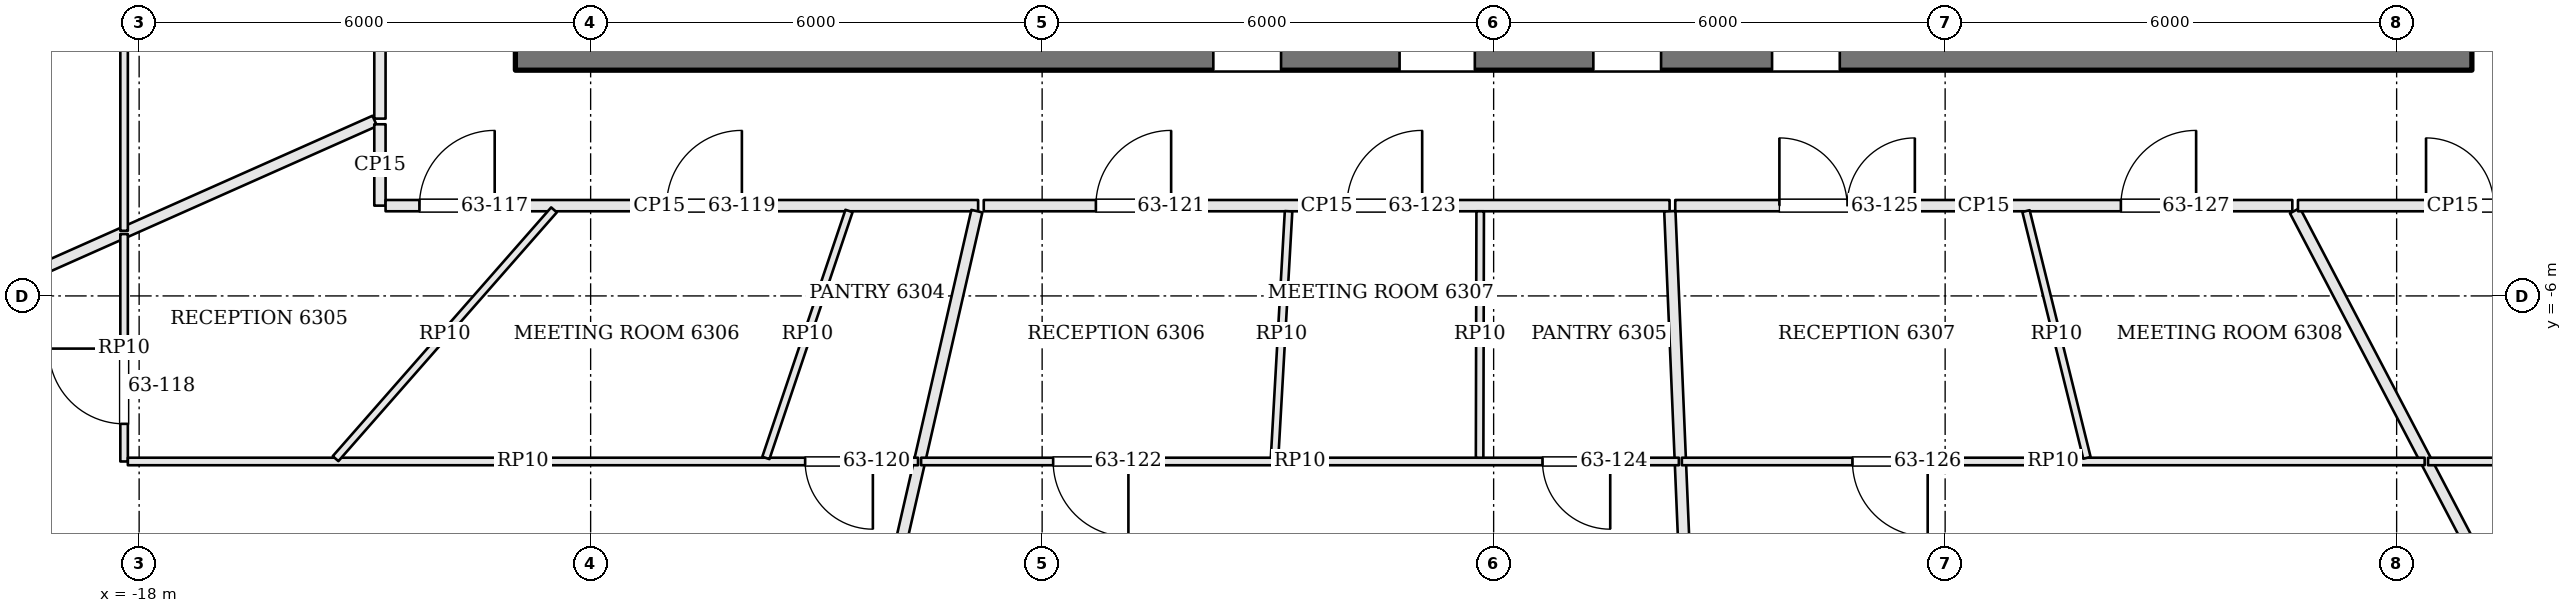
"""IFC4 building model, lengths in metres.
Left out: names, types, materials, properties, quantities, classifications, styles, units other than length and angle.
Written with IfcOpenShell. Run it as: python <this file> out.ifc"""

import sys

from ifc_helpers import new_model, si_unit, direction, frame, frame_2d, origin, place, context, subcontext, project, spatial, rectangle, extrude, element, fill, save


model = new_model("IFC4")
c1 = context("Model", 3, precision=1e-05, world=origin(), true_north=direction((0.0, 1.0)))
c2 = subcontext(c1, "Body", "Model", "MODEL_VIEW")
j1 = project(units=[si_unit("LENGTHUNIT", "METRE"), si_unit("PLANEANGLEUNIT", "RADIAN")], contexts=[c1])
p1 = place(None, origin())
s1 = spatial("IfcSite", under=j1, at=p1, CompositionType="ELEMENT")
p2 = place(p1, origin())
s2 = spatial("IfcBuilding", under=s1, at=p2, CompositionType="ELEMENT")
p3 = place(p2, frame((0.0, 0.0, 256.5)))
s3 = spatial("IfcBuildingStorey", under=s2, at=p3, CompositionType="ELEMENT", Elevation=256.5)
p4 = place(p3, frame((-13.0, -2.6, 0.0), z_axis=(0.0, 0.0, 1.0), x_axis=(1.0, 0.0, 0.0)))
e1 = element("IfcWall", 1, at=p4, inside=s3, PredefinedType="SHEAR", context=c2, shape_type="SweptSolid", body=[
    extrude(rectangle(XDim=26.0, YDim=0.8, at=frame_2d((13.0, 0.0))), origin(), (0.0, 0.0, 1.0), 3.9),
])
p5 = place(p4, frame((9.275, 0.0, 0.0)))
e2 = element("IfcOpeningElement", 2, at=p5, cuts=e1, PredefinedType="OPENING", context=c2, shape_type="SweptSolid", body=[
    extrude(rectangle(XDim=0.9, YDim=2.1, at=frame_2d((0.45, 1.05))), frame((0.0, 0.41, 0.0), z_axis=(0.0, -1.0, 0.0), x_axis=(1.0, 0.0, 0.0)), (0.0, 0.0, 1.0), 0.82),
])
p6 = place(p4, frame((11.75, 0.0, 0.0)))
e3 = element("IfcOpeningElement", 3, at=p6, cuts=e1, PredefinedType="OPENING", context=c2, shape_type="SweptSolid", body=[
    extrude(rectangle(XDim=1.0, YDim=2.1, at=frame_2d((0.5, 1.05))), frame((0.0, 0.41, 0.0), z_axis=(0.0, -1.0, 0.0), x_axis=(1.0, 0.0, 0.0)), (0.0, 0.0, 1.0), 0.82),
])
p7 = place(p4, frame((14.325, 0.0, 0.0)))
e4 = element("IfcOpeningElement", 4, at=p7, cuts=e1, PredefinedType="OPENING", context=c2, shape_type="SweptSolid", body=[
    extrude(rectangle(XDim=0.9, YDim=2.1, at=frame_2d((0.45, 1.05))), frame((0.0, 0.41, 0.0), z_axis=(0.0, -1.0, 0.0), x_axis=(1.0, 0.0, 0.0)), (0.0, 0.0, 1.0), 0.82),
])
p8 = place(p4, frame((16.7, 0.0, 0.0)))
e5 = element("IfcOpeningElement", 5, at=p8, cuts=e1, PredefinedType="OPENING", context=c2, shape_type="SweptSolid", body=[
    extrude(rectangle(XDim=0.9, YDim=2.1, at=frame_2d((0.45, 1.05))), frame((0.0, 0.41, 0.0), z_axis=(0.0, -1.0, 0.0), x_axis=(1.0, 0.0, 0.0)), (0.0, 0.0, 1.0), 0.82),
])
p9 = place(p3, frame((-14.8, 3.557, 0.0), z_axis=(0.0, 0.0, 1.0), x_axis=(0.0, -1.0, 0.0)))
e6 = element("IfcWall", 6, at=p9, inside=s3, PredefinedType="PARTITIONING", context=c2, shape_type="SweptSolid", body=[
    extrude(rectangle(XDim=7.2, YDim=0.15, at=frame_2d((3.6, 0.0))), origin(), (0.0, 0.0, 1.0), 3.084),
])
p10 = place(p9, frame((1.167, 0.0, 0.0)))
e7 = element("IfcOpeningElement", 7, at=p10, cuts=e6, PredefinedType="OPENING", context=c2, shape_type="SweptSolid", body=[
    extrude(rectangle(XDim=1.0, YDim=2.1, at=frame_2d((0.5, 1.05))), frame((0.0, 0.085, 0.0), z_axis=(0.0, -1.0, 0.0), x_axis=(1.0, 0.0, 0.0)), (0.0, 0.0, 1.0), 0.17),
])
p11 = place(p9, frame((4.805, 0.0, 0.0)))
e8 = element("IfcOpeningElement", 8, at=p11, cuts=e6, PredefinedType="OPENING", context=c2, shape_type="SweptSolid", body=[
    extrude(rectangle(XDim=1.0, YDim=2.4, at=frame_2d((0.5, 1.2))), frame((0.0, 0.085, 0.0), z_axis=(0.0, -1.0, 0.0), x_axis=(1.0, 0.0, 0.0)), (0.0, 0.0, 1.0), 0.17),
])
p12 = place(p3, frame((-26.367, -8.789, 0.0), z_axis=(0.0, 0.0, 1.0), x_axis=(0.913681107159, 0.40643183244, 0.0)))
e9 = element("IfcWall", 9, at=p12, inside=s3, PredefinedType="PARTITIONING", context=c2, shape_type="SweptSolid", body=[
    extrude(rectangle(XDim=12.585, YDim=0.15, at=frame_2d((6.292, 0.0))), origin(), (0.0, 0.0, 1.0), 3.084),
])
p13 = place(p3, frame((-14.8, -3.719, 0.0), z_axis=(0.0, 0.0, 1.0), x_axis=(0.0, -1.0, 0.0)))
e10 = element("IfcWall", 10, at=p13, inside=s3, PredefinedType="PARTITIONING", context=c2, shape_type="SweptSolid", body=[
    extrude(rectangle(XDim=1.081, YDim=0.15, at=frame_2d((0.541, 0.0))), origin(), (0.0, 0.0, 1.0), 3.084),
])
p14 = place(p3, frame((-14.725, -4.8, 0.0), z_axis=(0.0, 0.0, 1.0), x_axis=(1.0, 0.0, 0.0)))
e11 = element("IfcWall", 11, at=p14, inside=s3, PredefinedType="PARTITIONING", context=c2, shape_type="SweptSolid", body=[
    extrude(rectangle(XDim=7.875, YDim=0.15, at=frame_2d((3.937, 0.0))), origin(), (0.0, 0.0, 1.0), 3.084),
])
p15 = place(p14, frame((0.45, 0.0, 0.0)))
e12 = element("IfcOpeningElement", 12, at=p15, cuts=e11, PredefinedType="OPENING", context=c2, shape_type="SweptSolid", body=[
    extrude(rectangle(XDim=1.0, YDim=2.1, at=frame_2d((0.5, 1.05))), frame((0.0, 0.085, 0.0), z_axis=(0.0, -1.0, 0.0), x_axis=(1.0, 0.0, 0.0)), (0.0, 0.0, 1.0), 0.17),
])
p16 = place(p14, frame((3.735, 0.0, 0.0)))
e13 = element("IfcOpeningElement", 13, at=p16, cuts=e11, PredefinedType="OPENING", context=c2, shape_type="SweptSolid", body=[
    extrude(rectangle(XDim=1.0, YDim=2.4, at=frame_2d((0.5, 1.2))), frame((0.0, 0.085, 0.0), z_axis=(0.0, -1.0, 0.0), x_axis=(1.0, 0.0, 0.0)), (0.0, 0.0, 1.0), 0.17),
])
p17 = place(p3, frame((-10.519, -20.825, 0.0), z_axis=(0.0, 0.0, 1.0), x_axis=(0.223124554472, 0.974789943112, 0.0)))
e14 = element("IfcWall", 14, at=p17, inside=s3, PredefinedType="PARTITIONING", context=c2, shape_type="SweptSolid", body=[
    extrude(rectangle(XDim=16.365, YDim=0.15, at=frame_2d((8.182, 0.0))), origin(), (0.0, 0.0, 1.0), 3.084),
])
p18 = place(p3, frame((-6.776, -4.8, 0.0), z_axis=(0.0, 0.0, 1.0), x_axis=(1.0, 0.0, 0.0)))
e15 = element("IfcWall", 15, at=p18, inside=s3, PredefinedType="PARTITIONING", context=c2, shape_type="SweptSolid", body=[
    extrude(rectangle(XDim=9.114, YDim=0.15, at=frame_2d((4.557, 0.0))), origin(), (0.0, 0.0, 1.0), 3.084),
])
p19 = place(p18, frame((1.49, 0.0, 0.0)))
e16 = element("IfcOpeningElement", 16, at=p19, cuts=e15, PredefinedType="OPENING", context=c2, shape_type="SweptSolid", body=[
    extrude(rectangle(XDim=1.0, YDim=2.1, at=frame_2d((0.5, 1.05))), frame((0.0, 0.085, 0.0), z_axis=(0.0, -1.0, 0.0), x_axis=(1.0, 0.0, 0.0)), (0.0, 0.0, 1.0), 0.17),
])
p20 = place(p18, frame((4.826, 0.0, 0.0)))
e17 = element("IfcOpeningElement", 17, at=p20, cuts=e15, PredefinedType="OPENING", context=c2, shape_type="SweptSolid", body=[
    extrude(rectangle(XDim=1.0, YDim=2.4, at=frame_2d((0.5, 1.2))), frame((0.0, 0.085, 0.0), z_axis=(0.0, -1.0, 0.0), x_axis=(1.0, 0.0, 0.0)), (0.0, 0.0, 1.0), 0.17),
])
p21 = place(p3, frame((2.887, -17.832, 0.0), z_axis=(0.0, 0.0, 1.0), x_axis=(-0.042037723884, 0.999116024179, 0.0)))
e18 = element("IfcWall", 18, at=p21, inside=s3, PredefinedType="PARTITIONING", context=c2, shape_type="SweptSolid", body=[
    extrude(rectangle(XDim=12.969, YDim=0.15, at=frame_2d((6.484, 0.0))), origin(), (0.0, 0.0, 1.0), 3.084),
])
p22 = place(p3, frame((2.413, -4.8, 0.0), z_axis=(0.0, 0.0, 1.0), x_axis=(1.0, 0.0, 0.0)))
e19 = element("IfcWall", 19, at=p22, inside=s3, PredefinedType="PARTITIONING", context=c2, shape_type="SweptSolid", body=[
    extrude(rectangle(XDim=8.2, YDim=0.15, at=frame_2d((4.1, 0.0))), origin(), (0.0, 0.0, 1.0), 3.084),
])
p23 = place(p22, frame((1.384, 0.0, 0.0)))
e20 = element("IfcOpeningElement", 20, at=p23, cuts=e19, PredefinedType="OPENING", context=c2, shape_type="SweptSolid", body=[
    extrude(rectangle(XDim=1.8, YDim=2.1, at=frame_2d((0.9, 1.05))), frame((0.0, 0.085, 0.0), z_axis=(0.0, -1.0, 0.0), x_axis=(1.0, 0.0, 0.0)), (0.0, 0.0, 1.0), 0.17),
])
p24 = place(p22, frame((5.922, 0.0, 0.0)))
e21 = element("IfcOpeningElement", 21, at=p24, cuts=e19, PredefinedType="OPENING", context=c2, shape_type="SweptSolid", body=[
    extrude(rectangle(XDim=1.0, YDim=2.4, at=frame_2d((0.5, 1.2))), frame((0.0, 0.085, 0.0), z_axis=(0.0, -1.0, 0.0), x_axis=(1.0, 0.0, 0.0)), (0.0, 0.0, 1.0), 0.17),
])
p25 = place(p3, frame((17.193, -17.36, 0.0), z_axis=(0.0, 0.0, 1.0), x_axis=(-0.464008288338, 0.885830857643, 0.0)))
e22 = element("IfcWall", 22, at=p25, inside=s3, PredefinedType="PARTITIONING", context=c2, shape_type="SweptSolid", body=[
    extrude(rectangle(XDim=14.104, YDim=0.15, at=frame_2d((7.052, 0.0))), origin(), (0.0, 0.0, 1.0), 3.084),
])
p26 = place(p3, frame((10.689, -4.8, 0.0), z_axis=(0.0, 0.0, 1.0), x_axis=(1.0, 0.0, 0.0)))
e23 = element("IfcWall", 23, at=p26, inside=s3, PredefinedType="PARTITIONING", context=c2, shape_type="SweptSolid", body=[
    extrude(rectangle(XDim=4.111, YDim=0.15, at=frame_2d((2.056, 0.0))), origin(), (0.0, 0.0, 1.0), 3.084),
])
p27 = place(p26, frame((1.702, 0.0, 0.0)))
e24 = element("IfcOpeningElement", 24, at=p27, cuts=e23, PredefinedType="OPENING", context=c2, shape_type="SweptSolid", body=[
    extrude(rectangle(XDim=1.8, YDim=2.1, at=frame_2d((0.9, 1.05))), frame((0.0, 0.085, 0.0), z_axis=(0.0, -1.0, 0.0), x_axis=(1.0, 0.0, 0.0)), (0.0, 0.0, 1.0), 0.17),
])
p28 = place(p3, frame((-18.2, -5.134, 0.0), z_axis=(0.0, 0.0, 1.0), x_axis=(0.0, 1.0, 0.0)))
e25 = element("IfcWall", 25, at=p28, inside=s3, PredefinedType="PARTITIONING", context=c2, shape_type="SweptSolid", body=[
    extrude(rectangle(XDim=10.122, YDim=0.1, at=frame_2d((5.061, 0.0))), origin(), (0.0, 0.0, 1.0), 3.084),
])
p29 = place(p28, frame((7.217, 0.0, 0.0)))
e26 = element("IfcOpeningElement", 26, at=p29, cuts=e25, PredefinedType="OPENING", context=c2, shape_type="SweptSolid", body=[
    extrude(rectangle(XDim=1.0, YDim=2.1, at=frame_2d((0.5, 1.05))), frame((0.0, 0.06, 0.0), z_axis=(0.0, -1.0, 0.0), x_axis=(1.0, 0.0, 0.0)), (0.0, 0.0, 1.0), 0.12),
])
p30 = place(p3, frame((-18.2, -8.2, 0.0), z_axis=(0.0, 0.0, 1.0), x_axis=(0.0, 1.0, 0.0)))
e27 = element("IfcWall", 27, at=p30, inside=s3, PredefinedType="PARTITIONING", context=c2, shape_type="SweptSolid", body=[
    extrude(rectangle(XDim=3.022, YDim=0.1, at=frame_2d((1.511, 0.0))), origin(), (0.0, 0.0, 1.0), 3.084),
])
p31 = place(p30, frame((0.5, 0.0, 0.0)))
e28 = element("IfcOpeningElement", 28, at=p31, cuts=e27, PredefinedType="OPENING", context=c2, shape_type="SweptSolid", body=[
    extrude(rectangle(XDim=1.0, YDim=2.1, at=frame_2d((0.5, 1.05))), frame((0.0, 0.06, 0.0), z_axis=(0.0, -1.0, 0.0), x_axis=(1.0, 0.0, 0.0)), (0.0, 0.0, 1.0), 0.12),
])
p32 = place(p3, frame((-7.649, -8.2, 0.0), z_axis=(0.0, 0.0, 1.0), x_axis=(-1.0, 0.0, 0.0)))
e29 = element("IfcWall", 29, at=p32, inside=s3, PredefinedType="PARTITIONING", context=c2, shape_type="SweptSolid", body=[
    extrude(rectangle(XDim=10.5, YDim=0.1, at=frame_2d((5.25, 0.0))), origin(), (0.0, 0.0, 1.0), 3.084),
])
p33 = place(p32, frame((0.6, 0.0, 0.0)))
e30 = element("IfcOpeningElement", 30, at=p33, cuts=e29, PredefinedType="OPENING", context=c2, shape_type="SweptSolid", body=[
    extrude(rectangle(XDim=0.9, YDim=2.1, at=frame_2d((0.45, 1.05))), frame((0.0, 0.06, 0.0), z_axis=(0.0, -1.0, 0.0), x_axis=(1.0, 0.0, 0.0)), (0.0, 0.0, 1.0), 0.12),
])
p34 = place(p3, frame((-12.487, -4.856, 0.0), z_axis=(0.0, 0.0, 1.0), x_axis=(-0.659811872842, -0.751430830122, 0.0)))
e31 = element("IfcWall", 31, at=p34, inside=s3, PredefinedType="PARTITIONING", context=c2, shape_type="SweptSolid", body=[
    extrude(rectangle(XDim=4.399, YDim=0.1, at=frame_2d((2.2, 0.0))), origin(), (0.0, 0.0, 1.0), 3.084),
])
p35 = place(p3, frame((-8.567, -4.871, 0.0), z_axis=(0.0, 0.0, 1.0), x_axis=(-0.319060884331, -0.947734220175, 0.0)))
e32 = element("IfcWall", 32, at=p35, inside=s3, PredefinedType="PARTITIONING", context=c2, shape_type="SweptSolid", body=[
    extrude(rectangle(XDim=3.462, YDim=0.1, at=frame_2d((1.731, 0.0))), origin(), (0.0, 0.0, 1.0), 3.084),
])
p36 = place(p3, frame((2.461, -8.2, 0.0), z_axis=(0.0, 0.0, 1.0), x_axis=(-1.0, 0.0, 0.0)))
e33 = element("IfcWall", 33, at=p36, inside=s3, PredefinedType="PARTITIONING", context=c2, shape_type="SweptSolid", body=[
    extrude(rectangle(XDim=10.07, YDim=0.1, at=frame_2d((5.035, 0.0))), origin(), (0.0, 0.0, 1.0), 3.084),
])
p37 = place(p36, frame((7.315, 0.0, 0.0)))
e34 = element("IfcOpeningElement", 34, at=p37, cuts=e33, PredefinedType="OPENING", context=c2, shape_type="SweptSolid", body=[
    extrude(rectangle(XDim=1.0, YDim=2.1, at=frame_2d((0.5, 1.05))), frame((0.0, 0.06, 0.0), z_axis=(0.0, -1.0, 0.0), x_axis=(1.0, 0.0, 0.0)), (0.0, 0.0, 1.0), 0.12),
])
p38 = place(p36, frame((0.912, 0.0, 0.0)))
e35 = element("IfcOpeningElement", 35, at=p38, cuts=e33, PredefinedType="OPENING", context=c2, shape_type="SweptSolid", body=[
    extrude(rectangle(XDim=0.9, YDim=2.1, at=frame_2d((0.45, 1.05))), frame((0.0, 0.06, 0.0), z_axis=(0.0, -1.0, 0.0), x_axis=(1.0, 0.0, 0.0)), (0.0, 0.0, 1.0), 0.12),
])
p39 = place(p3, frame((-2.725, -4.875, 0.0), z_axis=(0.0, 0.0, 1.0), x_axis=(-0.056710673049, -0.998390654785, 0.0)))
e36 = element("IfcWall", 36, at=p39, inside=s3, PredefinedType="PARTITIONING", context=c2, shape_type="SweptSolid", body=[
    extrude(rectangle(XDim=3.281, YDim=0.1, at=frame_2d((1.64, 0.0))), origin(), (0.0, 0.0, 1.0), 3.084),
])
p40 = place(p3, frame((-0.179, -4.875, 0.0), z_axis=(0.0, 0.0, 1.0), x_axis=(-0.00238556053, -0.999997154546, 0.0)))
e37 = element("IfcWall", 37, at=p40, inside=s3, PredefinedType="PARTITIONING", context=c2, shape_type="SweptSolid", body=[
    extrude(rectangle(XDim=3.275, YDim=0.1, at=frame_2d((1.637, 0.0))), origin(), (0.0, 0.0, 1.0), 3.084),
])
p41 = place(p3, frame((12.372, -8.2, 0.0), z_axis=(0.0, 0.0, 1.0), x_axis=(-1.0, 0.0, 0.0)))
e38 = element("IfcWall", 38, at=p41, inside=s3, PredefinedType="PARTITIONING", context=c2, shape_type="SweptSolid", body=[
    extrude(rectangle(XDim=9.871, YDim=0.1, at=frame_2d((4.936, 0.0))), origin(), (0.0, 0.0, 1.0), 3.084),
])
p42 = place(p41, frame((6.604, 0.0, 0.0)))
e39 = element("IfcOpeningElement", 39, at=p42, cuts=e38, PredefinedType="OPENING", context=c2, shape_type="SweptSolid", body=[
    extrude(rectangle(XDim=1.0, YDim=2.1, at=frame_2d((0.5, 1.05))), frame((0.0, 0.06, 0.0), z_axis=(0.0, -1.0, 0.0), x_axis=(1.0, 0.0, 0.0)), (0.0, 0.0, 1.0), 0.12),
])
p43 = place(p3, frame((7.075, -4.873, 0.0), z_axis=(0.0, 0.0, 1.0), x_axis=(0.239779199404, -0.970827448898, 0.0)))
e40 = element("IfcWall", 40, at=p43, inside=s3, PredefinedType="PARTITIONING", context=c2, shape_type="SweptSolid", body=[
    extrude(rectangle(XDim=3.377, YDim=0.1, at=frame_2d((1.689, 0.0))), origin(), (0.0, 0.0, 1.0), 3.084),
])
p44 = place(p3, frame((18.15, -8.2, 0.0), z_axis=(0.0, 0.0, 1.0), x_axis=(-1.0, 0.0, 0.0)))
e41 = element("IfcWall", 41, at=p44, inside=s3, PredefinedType="PARTITIONING", context=c2, shape_type="SweptSolid", body=[
    extrude(rectangle(XDim=5.732, YDim=0.1, at=frame_2d((2.866, 0.0))), origin(), (0.0, 0.0, 1.0), 3.084),
])
p45 = place(p44, frame((1.185, 0.0, 0.0)))
e42 = element("IfcOpeningElement", 42, at=p45, cuts=e41, PredefinedType="OPENING", context=c2, shape_type="SweptSolid", body=[
    extrude(rectangle(XDim=1.0, YDim=2.1, at=frame_2d((0.5, 1.05))), frame((0.0, 0.06, 0.0), z_axis=(0.0, -1.0, 0.0), x_axis=(1.0, 0.0, 0.0)), (0.0, 0.0, 1.0), 0.12),
])
p46 = place(p15, origin())
e43 = element("IfcDoor", 43, at=p46, inside=s3, OperationType="SINGLE_SWING_RIGHT", PredefinedType="DOOR", context=c2, shape_type="SweptSolid", body=[
    extrude(rectangle(XDim=1.0, YDim=2.1, at=frame_2d((0.5, 1.05))), frame((0.0, 0.025, 0.0), z_axis=(0.0, -1.0, 0.0), x_axis=(1.0, 0.0, 0.0)), (0.0, 0.0, 1.0), 0.05),
])
fill(e12, e43)
p47 = place(p31, origin())
e44 = element("IfcDoor", 44, at=p47, inside=s3, OperationType="SINGLE_SWING_RIGHT", PredefinedType="DOOR", context=c2, shape_type="SweptSolid", body=[
    extrude(rectangle(XDim=1.0, YDim=2.1, at=frame_2d((0.5, 1.05))), frame((0.0, 0.025, 0.0), z_axis=(0.0, -1.0, 0.0), x_axis=(1.0, 0.0, 0.0)), (0.0, 0.0, 1.0), 0.05),
])
fill(e28, e44)
p48 = place(p16, origin())
e45 = element("IfcDoor", 45, at=p48, inside=s3, OperationType="SINGLE_SWING_RIGHT", PredefinedType="DOOR", context=c2, shape_type="SweptSolid", body=[
    extrude(rectangle(XDim=1.0, YDim=2.4, at=frame_2d((0.5, 1.2))), frame((0.0, 0.025, 0.0), z_axis=(0.0, -1.0, 0.0), x_axis=(1.0, 0.0, 0.0)), (0.0, 0.0, 1.0), 0.05),
])
fill(e13, e45)
p49 = place(p33, origin())
e46 = element("IfcDoor", 46, at=p49, inside=s3, OperationType="SINGLE_SWING_LEFT", PredefinedType="DOOR", context=c2, shape_type="SweptSolid", body=[
    extrude(rectangle(XDim=0.9, YDim=2.1, at=frame_2d((0.45, 1.05))), frame((0.0, 0.025, 0.0), z_axis=(0.0, -1.0, 0.0), x_axis=(1.0, 0.0, 0.0)), (0.0, 0.0, 1.0), 0.05),
])
fill(e30, e46)
p50 = place(p19, origin())
e47 = element("IfcDoor", 47, at=p50, inside=s3, OperationType="SINGLE_SWING_RIGHT", PredefinedType="DOOR", context=c2, shape_type="SweptSolid", body=[
    extrude(rectangle(XDim=1.0, YDim=2.1, at=frame_2d((0.5, 1.05))), frame((0.0, 0.025, 0.0), z_axis=(0.0, -1.0, 0.0), x_axis=(1.0, 0.0, 0.0)), (0.0, 0.0, 1.0), 0.05),
])
fill(e16, e47)
p51 = place(p37, origin())
e48 = element("IfcDoor", 48, at=p51, inside=s3, OperationType="SINGLE_SWING_LEFT", PredefinedType="DOOR", context=c2, shape_type="SweptSolid", body=[
    extrude(rectangle(XDim=1.0, YDim=2.1, at=frame_2d((0.5, 1.05))), frame((0.0, 0.025, 0.0), z_axis=(0.0, -1.0, 0.0), x_axis=(1.0, 0.0, 0.0)), (0.0, 0.0, 1.0), 0.05),
])
fill(e34, e48)
p52 = place(p20, origin())
e49 = element("IfcDoor", 49, at=p52, inside=s3, OperationType="SINGLE_SWING_RIGHT", PredefinedType="DOOR", context=c2, shape_type="SweptSolid", body=[
    extrude(rectangle(XDim=1.0, YDim=2.4, at=frame_2d((0.5, 1.2))), frame((0.0, 0.025, 0.0), z_axis=(0.0, -1.0, 0.0), x_axis=(1.0, 0.0, 0.0)), (0.0, 0.0, 1.0), 0.05),
])
fill(e17, e49)
p53 = place(p38, origin())
e50 = element("IfcDoor", 50, at=p53, inside=s3, OperationType="SINGLE_SWING_LEFT", PredefinedType="DOOR", context=c2, shape_type="SweptSolid", body=[
    extrude(rectangle(XDim=0.9, YDim=2.1, at=frame_2d((0.45, 1.05))), frame((0.0, 0.025, 0.0), z_axis=(0.0, -1.0, 0.0), x_axis=(1.0, 0.0, 0.0)), (0.0, 0.0, 1.0), 0.05),
])
fill(e35, e50)
p54 = place(p23, origin())
e51 = element("IfcDoor", 51, at=p54, inside=s3, OperationType="DOUBLE_DOOR_SINGLE_SWING", PredefinedType="DOOR", context=c2, shape_type="SweptSolid", body=[
    extrude(rectangle(XDim=1.8, YDim=2.1, at=frame_2d((0.9, 1.05))), frame((0.0, 0.025, 0.0), z_axis=(0.0, -1.0, 0.0), x_axis=(1.0, 0.0, 0.0)), (0.0, 0.0, 1.0), 0.05),
])
fill(e20, e51)
p55 = place(p42, origin())
e52 = element("IfcDoor", 52, at=p55, inside=s3, OperationType="SINGLE_SWING_LEFT", PredefinedType="DOOR", context=c2, shape_type="SweptSolid", body=[
    extrude(rectangle(XDim=1.0, YDim=2.1, at=frame_2d((0.5, 1.05))), frame((0.0, 0.025, 0.0), z_axis=(0.0, -1.0, 0.0), x_axis=(1.0, 0.0, 0.0)), (0.0, 0.0, 1.0), 0.05),
])
fill(e39, e52)
p56 = place(p24, origin())
e53 = element("IfcDoor", 53, at=p56, inside=s3, OperationType="SINGLE_SWING_RIGHT", PredefinedType="DOOR", context=c2, shape_type="SweptSolid", body=[
    extrude(rectangle(XDim=1.0, YDim=2.4, at=frame_2d((0.5, 1.2))), frame((0.0, 0.025, 0.0), z_axis=(0.0, -1.0, 0.0), x_axis=(1.0, 0.0, 0.0)), (0.0, 0.0, 1.0), 0.05),
])
fill(e21, e53)
p57 = place(p27, origin())
e54 = element("IfcDoor", 54, at=p57, inside=s3, OperationType="DOUBLE_DOOR_SINGLE_SWING", PredefinedType="DOOR", context=c2, shape_type="SweptSolid", body=[
    extrude(rectangle(XDim=1.8, YDim=2.1, at=frame_2d((0.9, 1.05))), frame((0.0, 0.025, 0.0), z_axis=(0.0, -1.0, 0.0), x_axis=(1.0, 0.0, 0.0)), (0.0, 0.0, 1.0), 0.05),
])
fill(e24, e54)
save(model, sys.argv[1])
